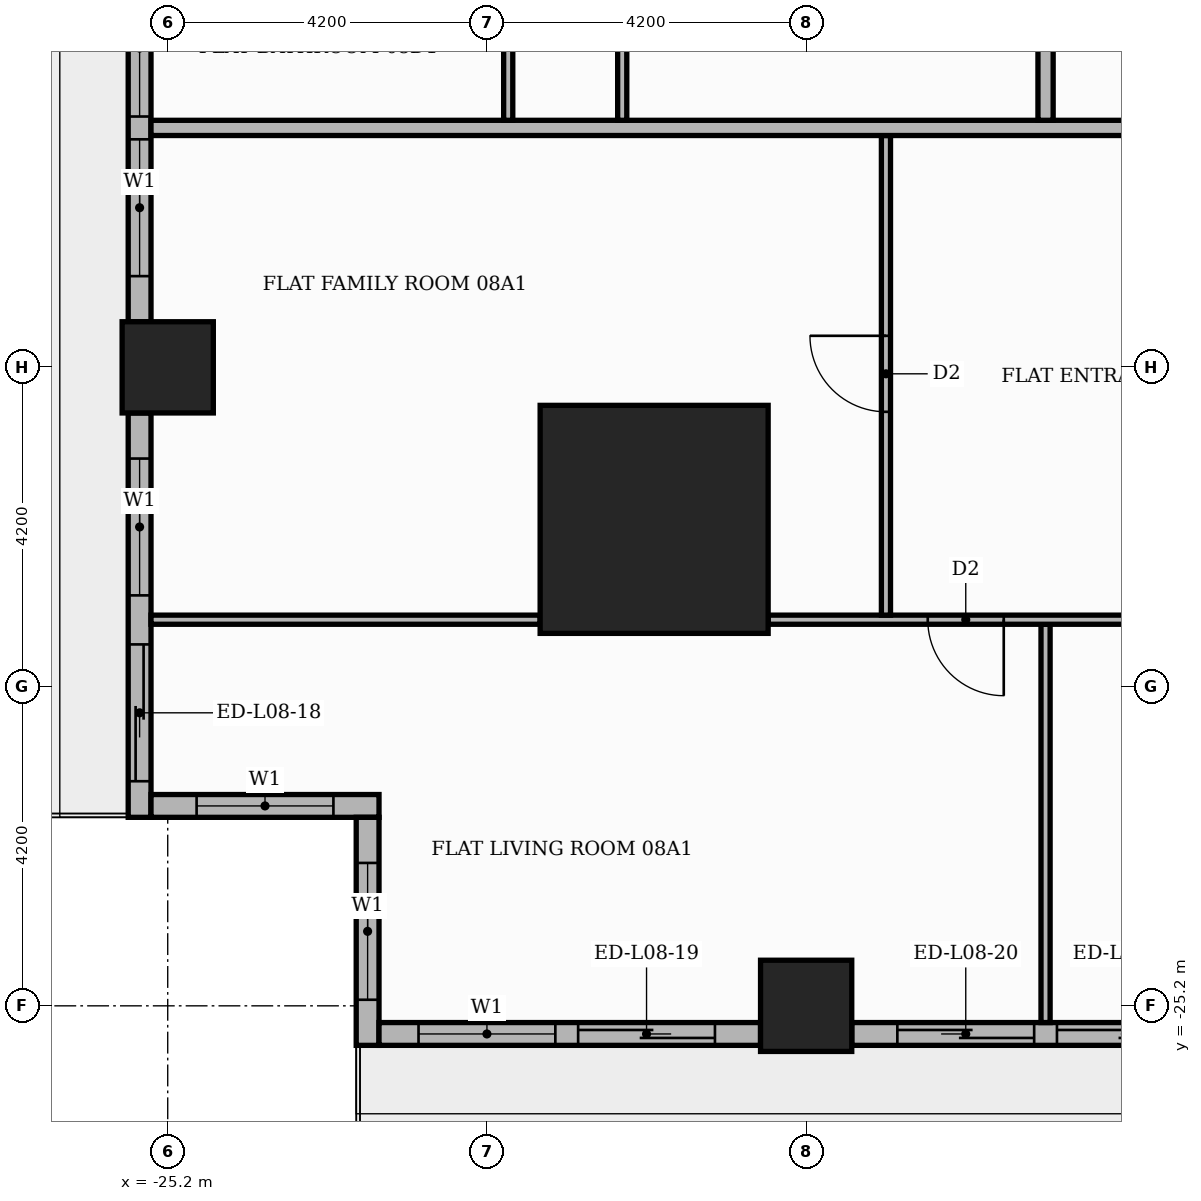
"""IFC4 building model, lengths in metres.
Left out: names, types, materials, properties, quantities, classifications, styles, units other than length and angle.
Written with IfcOpenShell. Run it as: python <this file> out.ifc"""

import sys

from ifc_helpers import new_model, si_unit, direction, frame, frame_2d, origin, origin_2d, place, context, subcontext, project, spatial, rectangle, extrude, element, fill, save


model = new_model("IFC4")
c1 = context("Model", 3, precision=1e-05, world=origin(), true_north=direction((0.0, 1.0)))
c2 = subcontext(c1, "Body", "Model", "MODEL_VIEW")
j1 = project(units=[si_unit("LENGTHUNIT", "METRE"), si_unit("PLANEANGLEUNIT", "RADIAN")], contexts=[c1])
p1 = place(None, origin())
s1 = spatial("IfcSite", under=j1, at=p1, CompositionType="ELEMENT")
p2 = place(p1, origin())
s2 = spatial("IfcBuilding", under=s1, at=p2, CompositionType="ELEMENT")
p3 = place(p2, frame((0.0, 0.0, 38.7)))
s3 = spatial("IfcBuildingStorey", under=s2, at=p3, CompositionType="ELEMENT", Elevation=38.7)
p4 = place(p3, frame((-18.8, -18.8, 0.0), z_axis=(0.0, 0.0, 1.0), x_axis=(1.0, 0.0, 0.0)))
e1 = element("IfcColumn", 1, at=p4, inside=s3, PredefinedType="COLUMN", context=c2, shape_type="SweptSolid", body=[
    extrude(rectangle(XDim=3.0, YDim=3.0, at=origin_2d()), origin(), (0.0, 0.0, 1.0), 3.9),
])
for number, where, z_axis, x_axis in (
    (2, (-16.8, -25.2, 0.0), (0.0, 0.0, 1.0), (1.0, 0.0, 0.0)),
    (3, (-25.2, -16.8, 0.0), (0.0, 0.0, 1.0), (1.0, 0.0, 0.0)),
):
    element("IfcColumn", number, at=place(p3, frame(where, z_axis=z_axis, x_axis=x_axis)), inside=s3, PredefinedType="COLUMN", context=c2, shape_type="SweptSolid", body=[
        extrude(rectangle(XDim=1.2, YDim=1.2, at=origin_2d()), origin(), (0.0, 0.0, 1.0), 3.9),
    ])
p5 = place(p3, frame((-25.57, -9.0, 0.0), z_axis=(0.0, 0.0, 1.0), x_axis=(0.0, -1.0, 0.0)))
e4 = element("IfcWall", 4, at=p5, inside=s3, PredefinedType="STANDARD", context=c2, shape_type="SweptSolid", body=[
    extrude(rectangle(XDim=7.2, YDim=0.3, at=frame_2d((3.6, 0.0))), origin(), (0.0, 0.0, 1.0), 3.48),
])
p6 = place(p5, frame((0.6, 0.0, 0.9)))
e5 = element("IfcOpeningElement", 5, at=p6, cuts=e4, PredefinedType="OPENING", context=c2, shape_type="SweptSolid", body=[
    extrude(rectangle(XDim=1.8, YDim=2.1, at=frame_2d((0.9, 1.05))), frame((0.0, 0.16, 0.0), z_axis=(0.0, -1.0, 0.0), x_axis=(1.0, 0.0, 0.0)), (0.0, 0.0, 1.0), 0.32),
])
p7 = place(p5, frame((2.7, 0.0, 0.9)))
e6 = element("IfcOpeningElement", 6, at=p7, cuts=e4, PredefinedType="OPENING", context=c2, shape_type="SweptSolid", body=[
    extrude(rectangle(XDim=1.8, YDim=2.1, at=frame_2d((0.9, 1.05))), frame((0.0, 0.16, 0.0), z_axis=(0.0, -1.0, 0.0), x_axis=(1.0, 0.0, 0.0)), (0.0, 0.0, 1.0), 0.32),
])
p8 = place(p5, frame((4.8, 0.0, 0.9)))
e7 = element("IfcOpeningElement", 7, at=p8, cuts=e4, PredefinedType="OPENING", context=c2, shape_type="SweptSolid", body=[
    extrude(rectangle(XDim=1.8, YDim=2.1, at=frame_2d((0.9, 1.05))), frame((0.0, 0.16, 0.0), z_axis=(0.0, -1.0, 0.0), x_axis=(1.0, 0.0, 0.0)), (0.0, 0.0, 1.0), 0.32),
])
p9 = place(p3, frame((-25.57, -17.4, 0.0), z_axis=(0.0, 0.0, 1.0), x_axis=(0.0, -1.0, 0.0)))
e8 = element("IfcWall", 8, at=p9, inside=s3, PredefinedType="STANDARD", context=c2, shape_type="SweptSolid", body=[
    extrude(rectangle(XDim=5.32, YDim=0.3, at=frame_2d((2.66, 0.0))), origin(), (0.0, 0.0, 1.0), 3.48),
])
p10 = place(p9, frame((0.6, 0.0, 0.9)))
e9 = element("IfcOpeningElement", 9, at=p10, cuts=e8, PredefinedType="OPENING", context=c2, shape_type="SweptSolid", body=[
    extrude(rectangle(XDim=1.8, YDim=2.1, at=frame_2d((0.9, 1.05))), frame((0.0, 0.16, 0.0), z_axis=(0.0, -1.0, 0.0), x_axis=(1.0, 0.0, 0.0)), (0.0, 0.0, 1.0), 0.32),
])
p11 = place(p9, frame((3.045, 0.0, 0.0)))
e10 = element("IfcOpeningElement", 10, at=p11, cuts=e8, PredefinedType="OPENING", context=c2, shape_type="SweptSolid", body=[
    extrude(rectangle(XDim=1.8, YDim=2.4, at=frame_2d((0.9, 1.2))), frame((0.0, 0.16, 0.0), z_axis=(0.0, -1.0, 0.0), x_axis=(1.0, 0.0, 0.0)), (0.0, 0.0, 1.0), 0.32),
])
p12 = place(p3, frame((-25.42, -22.57, 0.0), z_axis=(0.0, 0.0, 1.0), x_axis=(1.0, 0.0, 0.0)))
e11 = element("IfcWall", 11, at=p12, inside=s3, PredefinedType="STANDARD", context=c2, shape_type="SweptSolid", body=[
    extrude(rectangle(XDim=3.0, YDim=0.3, at=frame_2d((1.5, 0.0))), origin(), (0.0, 0.0, 1.0), 3.48),
])
p13 = place(p12, frame((0.6, 0.0, 0.9)))
e12 = element("IfcOpeningElement", 12, at=p13, cuts=e11, PredefinedType="OPENING", context=c2, shape_type="SweptSolid", body=[
    extrude(rectangle(XDim=1.8, YDim=2.1, at=frame_2d((0.9, 1.05))), frame((0.0, 0.16, 0.0), z_axis=(0.0, -1.0, 0.0), x_axis=(1.0, 0.0, 0.0)), (0.0, 0.0, 1.0), 0.32),
])
p14 = place(p3, frame((-22.57, -22.72, 0.0), z_axis=(0.0, 0.0, 1.0), x_axis=(0.0, -1.0, 0.0)))
e13 = element("IfcWall", 13, at=p14, inside=s3, PredefinedType="STANDARD", context=c2, shape_type="SweptSolid", body=[
    extrude(rectangle(XDim=3.0, YDim=0.3, at=frame_2d((1.5, 0.0))), origin(), (0.0, 0.0, 1.0), 3.48),
])
p15 = place(p14, frame((0.6, 0.0, 0.9)))
e14 = element("IfcOpeningElement", 14, at=p15, cuts=e13, PredefinedType="OPENING", context=c2, shape_type="SweptSolid", body=[
    extrude(rectangle(XDim=1.8, YDim=2.1, at=frame_2d((0.9, 1.05))), frame((0.0, 0.16, 0.0), z_axis=(0.0, -1.0, 0.0), x_axis=(1.0, 0.0, 0.0)), (0.0, 0.0, 1.0), 0.32),
])
p16 = place(p3, frame((-22.42, -25.57, 0.0), z_axis=(0.0, 0.0, 1.0), x_axis=(1.0, 0.0, 0.0)))
e15 = element("IfcWall", 15, at=p16, inside=s3, PredefinedType="STANDARD", context=c2, shape_type="SweptSolid", body=[
    extrude(rectangle(XDim=5.02, YDim=0.3, at=frame_2d((2.51, 0.0))), origin(), (0.0, 0.0, 1.0), 3.48),
])
p17 = place(p16, frame((0.52, 0.0, 0.9)))
e16 = element("IfcOpeningElement", 16, at=p17, cuts=e15, PredefinedType="OPENING", context=c2, shape_type="SweptSolid", body=[
    extrude(rectangle(XDim=1.8, YDim=2.1, at=frame_2d((0.9, 1.05))), frame((0.0, 0.16, 0.0), z_axis=(0.0, -1.0, 0.0), x_axis=(1.0, 0.0, 0.0)), (0.0, 0.0, 1.0), 0.32),
])
p18 = place(p16, frame((2.62, 0.0, 0.0)))
e17 = element("IfcOpeningElement", 17, at=p18, cuts=e15, PredefinedType="OPENING", context=c2, shape_type="SweptSolid", body=[
    extrude(rectangle(XDim=1.8, YDim=2.4, at=frame_2d((0.9, 1.2))), frame((0.0, 0.16, 0.0), z_axis=(0.0, -1.0, 0.0), x_axis=(1.0, 0.0, 0.0)), (0.0, 0.0, 1.0), 0.32),
])
p19 = place(p3, frame((-16.2, -25.57, 0.0), z_axis=(0.0, 0.0, 1.0), x_axis=(1.0, 0.0, 0.0)))
e18 = element("IfcWall", 18, at=p19, inside=s3, PredefinedType="STANDARD", context=c2, shape_type="SweptSolid", body=[
    extrude(rectangle(XDim=7.2, YDim=0.3, at=frame_2d((3.6, 0.0))), origin(), (0.0, 0.0, 1.0), 3.48),
])
p20 = place(p19, frame((0.6, 0.0, 0.0)))
e19 = element("IfcOpeningElement", 19, at=p20, cuts=e18, PredefinedType="OPENING", context=c2, shape_type="SweptSolid", body=[
    extrude(rectangle(XDim=1.8, YDim=2.4, at=frame_2d((0.9, 1.2))), frame((0.0, 0.16, 0.0), z_axis=(0.0, -1.0, 0.0), x_axis=(1.0, 0.0, 0.0)), (0.0, 0.0, 1.0), 0.32),
])
p21 = place(p19, frame((2.7, 0.0, 0.0)))
e20 = element("IfcOpeningElement", 20, at=p21, cuts=e18, PredefinedType="OPENING", context=c2, shape_type="SweptSolid", body=[
    extrude(rectangle(XDim=1.8, YDim=2.4, at=frame_2d((0.9, 1.2))), frame((0.0, 0.16, 0.0), z_axis=(0.0, -1.0, 0.0), x_axis=(1.0, 0.0, 0.0)), (0.0, 0.0, 1.0), 0.32),
])
p22 = place(p19, frame((4.8, 0.0, 0.9)))
e21 = element("IfcOpeningElement", 21, at=p22, cuts=e18, PredefinedType="OPENING", context=c2, shape_type="SweptSolid", body=[
    extrude(rectangle(XDim=1.8, YDim=2.1, at=frame_2d((0.9, 1.05))), frame((0.0, 0.16, 0.0), z_axis=(0.0, -1.0, 0.0), x_axis=(1.0, 0.0, 0.0)), (0.0, 0.0, 1.0), 0.32),
])
p23 = place(p3, frame((-13.65, -25.42, 0.0), z_axis=(0.0, 0.0, 1.0), x_axis=(0.0, 1.0, 0.0)))
e22 = element("IfcWall", 22, at=p23, inside=s3, PredefinedType="PARTITIONING", context=c2, shape_type="SweptSolid", body=[
    extrude(rectangle(XDim=5.24, YDim=0.12, at=frame_2d((2.62, 0.0))), origin(), (0.0, 0.0, 1.0), 3.48),
])
p24 = place(p3, frame((-25.42, -20.12, 0.0), z_axis=(0.0, 0.0, 1.0), x_axis=(1.0, 0.0, 0.0)))
e23 = element("IfcWall", 23, at=p24, inside=s3, PredefinedType="PARTITIONING", context=c2, shape_type="SweptSolid", body=[
    extrude(rectangle(XDim=5.12, YDim=0.12, at=frame_2d((2.56, 0.0))), origin(), (0.0, 0.0, 1.0), 3.48),
])
p25 = place(p3, frame((-17.3, -20.12, 0.0), z_axis=(0.0, 0.0, 1.0), x_axis=(1.0, 0.0, 0.0)))
e24 = element("IfcWall", 24, at=p25, inside=s3, PredefinedType="PARTITIONING", context=c2, shape_type="SweptSolid", body=[
    extrude(rectangle(XDim=11.95, YDim=0.12, at=frame_2d((5.975, 0.0))), origin(), (0.0, 0.0, 1.0), 3.48),
])
p26 = place(p25, frame((2.1, 0.0, 0.0)))
e25 = element("IfcOpeningElement", 25, at=p26, cuts=e24, PredefinedType="OPENING", context=c2, shape_type="SweptSolid", body=[
    extrude(rectangle(XDim=1.0, YDim=2.1, at=frame_2d((0.5, 1.05))), frame((0.0, 0.07, 0.0), z_axis=(0.0, -1.0, 0.0), x_axis=(1.0, 0.0, 0.0)), (0.0, 0.0, 1.0), 0.14),
])
p27 = place(p25, frame((5.3, 0.0, 0.0)))
e26 = element("IfcOpeningElement", 26, at=p27, cuts=e24, PredefinedType="OPENING", context=c2, shape_type="SweptSolid", body=[
    extrude(rectangle(XDim=0.9, YDim=2.1, at=frame_2d((0.45, 1.05))), frame((0.0, 0.07, 0.0), z_axis=(0.0, -1.0, 0.0), x_axis=(1.0, 0.0, 0.0)), (0.0, 0.0, 1.0), 0.14),
])
p28 = place(p3, frame((-15.75, -20.06, 0.0), z_axis=(0.0, 0.0, 1.0), x_axis=(0.0, 1.0, 0.0)))
e27 = element("IfcWall", 27, at=p28, inside=s3, PredefinedType="PARTITIONING", context=c2, shape_type="SweptSolid", body=[
    extrude(rectangle(XDim=6.31, YDim=0.12, at=frame_2d((3.155, 0.0))), origin(), (0.0, 0.0, 1.0), 3.48),
])
p29 = place(p28, frame((2.675, 0.0, 0.0)))
e28 = element("IfcOpeningElement", 28, at=p29, cuts=e27, PredefinedType="OPENING", context=c2, shape_type="SweptSolid", body=[
    extrude(rectangle(XDim=1.0, YDim=2.1, at=frame_2d((0.5, 1.05))), frame((0.0, 0.07, 0.0), z_axis=(0.0, -1.0, 0.0), x_axis=(1.0, 0.0, 0.0)), (0.0, 0.0, 1.0), 0.14),
])
p30 = place(p3, frame((-25.42, -13.65, 0.0), z_axis=(0.0, 0.0, 1.0), x_axis=(1.0, 0.0, 0.0)))
e29 = element("IfcWall", 29, at=p30, inside=s3, PredefinedType="PARTITIONING", context=c2, shape_type="SweptSolid", body=[
    extrude(rectangle(XDim=39.07, YDim=0.2, at=frame_2d((19.535, 0.0))), origin(), (0.0, 0.0, 1.0), 3.48),
])
p31 = place(p30, frame((13.32, 0.0, 0.0)))
e30 = element("IfcOpeningElement", 30, at=p31, cuts=e29, PredefinedType="OPENING", context=c2, shape_type="SweptSolid", body=[
    extrude(rectangle(XDim=1.1, YDim=2.4, at=frame_2d((0.55, 1.2))), frame((0.0, 0.11, 0.0), z_axis=(0.0, -1.0, 0.0), x_axis=(1.0, 0.0, 0.0)), (0.0, 0.0, 1.0), 0.22),
])
p32 = place(p30, frame((21.72, 0.0, 0.0)))
e31 = element("IfcOpeningElement", 31, at=p32, cuts=e29, PredefinedType="OPENING", context=c2, shape_type="SweptSolid", body=[
    extrude(rectangle(XDim=1.1, YDim=2.4, at=frame_2d((0.55, 1.2))), frame((0.0, 0.11, 0.0), z_axis=(0.0, -1.0, 0.0), x_axis=(1.0, 0.0, 0.0)), (0.0, 0.0, 1.0), 0.22),
])
p33 = place(p3, frame((-20.72, -13.55, 0.0), z_axis=(0.0, 0.0, 1.0), x_axis=(0.0, 1.0, 0.0)))
e32 = element("IfcWall", 32, at=p33, inside=s3, PredefinedType="PARTITIONING", context=c2, shape_type="SweptSolid", body=[
    extrude(rectangle(XDim=1.94, YDim=0.12, at=frame_2d((0.97, 0.0))), origin(), (0.0, 0.0, 1.0), 3.48),
])
p34 = place(p3, frame((-19.22, -13.55, 0.0), z_axis=(0.0, 0.0, 1.0), x_axis=(0.0, 1.0, 0.0)))
e33 = element("IfcWall", 33, at=p34, inside=s3, PredefinedType="PARTITIONING", context=c2, shape_type="SweptSolid", body=[
    extrude(rectangle(XDim=3.74, YDim=0.12, at=frame_2d((1.87, 0.0))), origin(), (0.0, 0.0, 1.0), 3.48),
])
p35 = place(p34, frame((1.4, 0.0, 0.0)))
e34 = element("IfcOpeningElement", 34, at=p35, cuts=e33, PredefinedType="OPENING", context=c2, shape_type="SweptSolid", body=[
    extrude(rectangle(XDim=0.9, YDim=2.1, at=frame_2d((0.45, 1.05))), frame((0.0, 0.07, 0.0), z_axis=(0.0, -1.0, 0.0), x_axis=(1.0, 0.0, 0.0)), (0.0, 0.0, 1.0), 0.14),
])
p36 = place(p3, frame((-13.65, -13.55, 0.0), z_axis=(0.0, 0.0, 1.0), x_axis=(0.0, 1.0, 0.0)))
e35 = element("IfcWall", 35, at=p36, inside=s3, PredefinedType="PARTITIONING", context=c2, shape_type="SweptSolid", body=[
    extrude(rectangle(XDim=27.1, YDim=0.2, at=frame_2d((13.55, 0.0))), origin(), (0.0, 0.0, 1.0), 3.48),
])
p37 = place(p36, frame((24.55, 0.0, 0.0)))
e36 = element("IfcOpeningElement", 36, at=p37, cuts=e35, PredefinedType="OPENING", context=c2, shape_type="SweptSolid", body=[
    extrude(rectangle(XDim=1.1, YDim=2.4, at=frame_2d((0.55, 1.2))), frame((0.0, 0.11, 0.0), z_axis=(0.0, -1.0, 0.0), x_axis=(1.0, 0.0, 0.0)), (0.0, 0.0, 1.0), 0.22),
])
p38 = place(p7, origin())
e37 = element("IfcWindow", 37, at=p38, inside=s3, PartitioningType="SINGLE_PANEL", PredefinedType="WINDOW", context=c2, shape_type="SweptSolid", body=[
    extrude(rectangle(XDim=1.8, YDim=2.1, at=frame_2d((0.9, 1.05))), frame((0.0, 0.03, 0.0), z_axis=(0.0, -1.0, 0.0), x_axis=(1.0, 0.0, 0.0)), (0.0, 0.0, 1.0), 0.06),
])
fill(e6, e37)
p39 = place(p8, origin())
e38 = element("IfcWindow", 38, at=p39, inside=s3, PartitioningType="SINGLE_PANEL", PredefinedType="WINDOW", context=c2, shape_type="SweptSolid", body=[
    extrude(rectangle(XDim=1.8, YDim=2.1, at=frame_2d((0.9, 1.05))), frame((0.0, 0.03, 0.0), z_axis=(0.0, -1.0, 0.0), x_axis=(1.0, 0.0, 0.0)), (0.0, 0.0, 1.0), 0.06),
])
fill(e7, e38)
p40 = place(p10, origin())
e39 = element("IfcWindow", 39, at=p40, inside=s3, PartitioningType="SINGLE_PANEL", PredefinedType="WINDOW", context=c2, shape_type="SweptSolid", body=[
    extrude(rectangle(XDim=1.8, YDim=2.1, at=frame_2d((0.9, 1.05))), frame((0.0, 0.03, 0.0), z_axis=(0.0, -1.0, 0.0), x_axis=(1.0, 0.0, 0.0)), (0.0, 0.0, 1.0), 0.06),
])
fill(e9, e39)
p41 = place(p11, origin())
e40 = element("IfcDoor", 40, at=p41, inside=s3, OperationType="SLIDING_TO_RIGHT", PredefinedType="DOOR", context=c2, shape_type="SweptSolid", body=[
    extrude(rectangle(XDim=1.8, YDim=2.4, at=frame_2d((0.9, 1.2))), frame((0.0, 0.025, 0.0), z_axis=(0.0, -1.0, 0.0), x_axis=(1.0, 0.0, 0.0)), (0.0, 0.0, 1.0), 0.05),
])
fill(e10, e40)
p42 = place(p13, origin())
e41 = element("IfcWindow", 41, at=p42, inside=s3, PartitioningType="SINGLE_PANEL", PredefinedType="WINDOW", context=c2, shape_type="SweptSolid", body=[
    extrude(rectangle(XDim=1.8, YDim=2.1, at=frame_2d((0.9, 1.05))), frame((0.0, 0.03, 0.0), z_axis=(0.0, -1.0, 0.0), x_axis=(1.0, 0.0, 0.0)), (0.0, 0.0, 1.0), 0.06),
])
fill(e12, e41)
p43 = place(p15, origin())
e42 = element("IfcWindow", 42, at=p43, inside=s3, PartitioningType="SINGLE_PANEL", PredefinedType="WINDOW", context=c2, shape_type="SweptSolid", body=[
    extrude(rectangle(XDim=1.8, YDim=2.1, at=frame_2d((0.9, 1.05))), frame((0.0, 0.03, 0.0), z_axis=(0.0, -1.0, 0.0), x_axis=(1.0, 0.0, 0.0)), (0.0, 0.0, 1.0), 0.06),
])
fill(e14, e42)
p44 = place(p17, origin())
e43 = element("IfcWindow", 43, at=p44, inside=s3, PartitioningType="SINGLE_PANEL", PredefinedType="WINDOW", context=c2, shape_type="SweptSolid", body=[
    extrude(rectangle(XDim=1.8, YDim=2.1, at=frame_2d((0.9, 1.05))), frame((0.0, 0.03, 0.0), z_axis=(0.0, -1.0, 0.0), x_axis=(1.0, 0.0, 0.0)), (0.0, 0.0, 1.0), 0.06),
])
fill(e16, e43)
p45 = place(p18, origin())
e44 = element("IfcDoor", 44, at=p45, inside=s3, OperationType="SLIDING_TO_RIGHT", PredefinedType="DOOR", context=c2, shape_type="SweptSolid", body=[
    extrude(rectangle(XDim=1.8, YDim=2.4, at=frame_2d((0.9, 1.2))), frame((0.0, 0.025, 0.0), z_axis=(0.0, -1.0, 0.0), x_axis=(1.0, 0.0, 0.0)), (0.0, 0.0, 1.0), 0.05),
])
fill(e17, e44)
p46 = place(p20, origin())
e45 = element("IfcDoor", 45, at=p46, inside=s3, OperationType="SLIDING_TO_LEFT", PredefinedType="DOOR", context=c2, shape_type="SweptSolid", body=[
    extrude(rectangle(XDim=1.8, YDim=2.4, at=frame_2d((0.9, 1.2))), frame((0.0, 0.025, 0.0), z_axis=(0.0, -1.0, 0.0), x_axis=(1.0, 0.0, 0.0)), (0.0, 0.0, 1.0), 0.05),
])
fill(e19, e45)
p47 = place(p21, origin())
e46 = element("IfcDoor", 46, at=p47, inside=s3, OperationType="SLIDING_TO_RIGHT", PredefinedType="DOOR", context=c2, shape_type="SweptSolid", body=[
    extrude(rectangle(XDim=1.8, YDim=2.4, at=frame_2d((0.9, 1.2))), frame((0.0, 0.025, 0.0), z_axis=(0.0, -1.0, 0.0), x_axis=(1.0, 0.0, 0.0)), (0.0, 0.0, 1.0), 0.05),
])
fill(e20, e46)
p48 = place(p29, origin())
e47 = element("IfcDoor", 47, at=p48, inside=s3, OperationType="SINGLE_SWING_RIGHT", PredefinedType="DOOR", context=c2, shape_type="SweptSolid", body=[
    extrude(rectangle(XDim=1.0, YDim=2.1, at=frame_2d((0.5, 1.05))), frame((0.0, 0.025, 0.0), z_axis=(0.0, -1.0, 0.0), x_axis=(1.0, 0.0, 0.0)), (0.0, 0.0, 1.0), 0.05),
])
fill(e28, e47)
p49 = place(p26, frame((1.0, 0.0, 0.0), z_axis=(0.0, 0.0, 1.0), x_axis=(-1.0, 0.0, 0.0)))
e48 = element("IfcDoor", 48, at=p49, inside=s3, OperationType="SINGLE_SWING_RIGHT", PredefinedType="DOOR", context=c2, shape_type="SweptSolid", body=[
    extrude(rectangle(XDim=1.0, YDim=2.1, at=frame_2d((0.5, 1.05))), frame((0.0, 0.025, 0.0), z_axis=(0.0, -1.0, 0.0), x_axis=(1.0, 0.0, 0.0)), (0.0, 0.0, 1.0), 0.05),
])
fill(e25, e48)
save(model, sys.argv[1])
